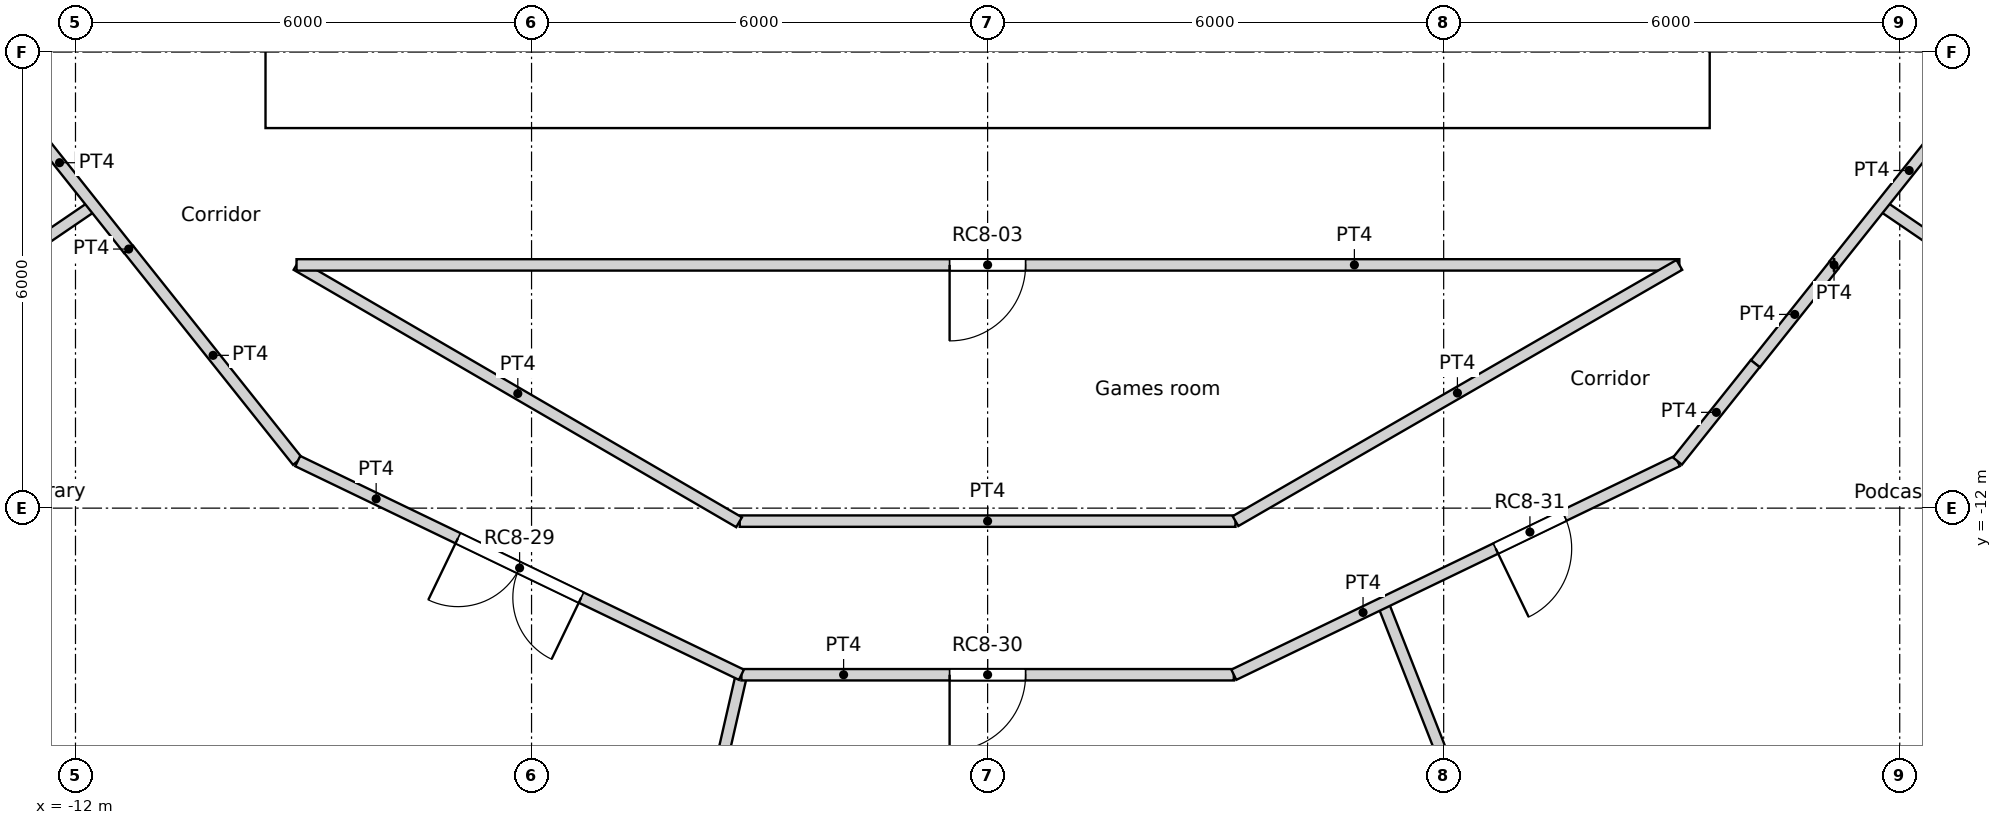
"""IFC4 building model, lengths in metres.
Left out: names, types, materials, properties, quantities, classifications, styles, units other than length and angle.
Written with IfcOpenShell. Run it as: python <this file> out.ifc"""

import sys

from ifc_helpers import new_model, si_unit, direction, frame, frame_2d, origin, origin_2d, place, context, subcontext, project, spatial, rectangle, circle, extrude, element, fill, save


model = new_model("IFC4")
c1 = context("Model", 3, precision=1e-05, world=origin(), true_north=direction((0.0, 1.0)))
c2 = subcontext(c1, "Body", "Model", "MODEL_VIEW")
j1 = project(units=[si_unit("LENGTHUNIT", "METRE"), si_unit("PLANEANGLEUNIT", "RADIAN")], contexts=[c1])
p1 = place(None, origin())
s1 = spatial("IfcSite", under=j1, at=p1, CompositionType="ELEMENT")
p2 = place(p1, origin())
s2 = spatial("IfcBuilding", under=s1, at=p2, CompositionType="ELEMENT")
p3 = place(p2, frame((0.0, 0.0, 305.4)))
s3 = spatial("IfcBuildingStorey", under=s2, at=p3, CompositionType="ELEMENT", Elevation=305.4)
p4 = place(p3, frame((11.735, -14.716, 0.0), z_axis=(0.0, 0.0, 1.0), x_axis=(1.0, 0.0, 0.0)))
e1 = element("IfcColumn", 1, at=p4, inside=s3, PredefinedType="COLUMN", context=c2, shape_type="SweptSolid", body=[
    extrude(circle(Radius=0.45, at=origin_2d()), origin(), (0.0, 0.0, 1.0), 3.6),
])
p5 = place(p3, frame((-9.5, -6.7, 0.0), z_axis=(0.0, 0.0, 1.0), x_axis=(1.0, 0.0, 0.0)))
e2 = element("IfcWall", 2, at=p5, inside=s3, PredefinedType="SOLIDWALL", context=c2, shape_type="SweptSolid", body=[
    extrude(rectangle(XDim=19.0, YDim=0.6, at=frame_2d((9.5, 0.0))), origin(), (0.0, 0.0, 1.0), 3.6),
])
p6 = place(p5, frame((10.4, 0.0, 0.0)))
e3 = element("IfcOpeningElement", 3, at=p6, cuts=e2, PredefinedType="OPENING", context=c2, shape_type="SweptSolid", body=[
    extrude(rectangle(XDim=1.0, YDim=2.1, at=frame_2d((0.5, 1.05))), frame((0.0, 0.3, 0.0), z_axis=(0.0, -1.0, 0.0), x_axis=(1.0, 0.0, 0.0)), (0.0, 0.0, 1.0), 0.6),
])
p7 = place(p5, frame((5.35, 0.0, 0.0)))
e4 = element("IfcOpeningElement", 4, at=p7, cuts=e2, PredefinedType="OPENING", context=c2, shape_type="SweptSolid", body=[
    extrude(rectangle(XDim=1.7, YDim=2.1, at=frame_2d((0.85, 1.05))), frame((0.0, 0.3, 0.0), z_axis=(0.0, -1.0, 0.0), x_axis=(1.0, 0.0, 0.0)), (0.0, 0.0, 1.0), 0.6),
])
p8 = place(p5, frame((11.95, 0.0, 0.0)))
e5 = element("IfcOpeningElement", 5, at=p8, cuts=e2, PredefinedType="OPENING", context=c2, shape_type="SweptSolid", body=[
    extrude(rectangle(XDim=1.7, YDim=2.1, at=frame_2d((0.85, 1.05))), frame((0.0, 0.3, 0.0), z_axis=(0.0, -1.0, 0.0), x_axis=(1.0, 0.0, 0.0)), (0.0, 0.0, 1.0), 0.6),
])
p9 = place(p3, frame((-9.2, -6.4, 0.0), z_axis=(0.0, 0.0, 1.0), x_axis=(0.0, 1.0, 0.0)))
e6 = element("IfcWall", 6, at=p9, inside=s3, PredefinedType="SOLIDWALL", context=c2, shape_type="SweptSolid", body=[
    extrude(rectangle(XDim=12.8, YDim=0.6, at=frame_2d((6.4, 0.0))), origin(), (0.0, 0.0, 1.0), 3.6),
])
p10 = place(p3, frame((9.2, -6.4, 0.0), z_axis=(0.0, 0.0, 1.0), x_axis=(0.0, 1.0, 0.0)))
e7 = element("IfcWall", 7, at=p10, inside=s3, PredefinedType="SOLIDWALL", context=c2, shape_type="SweptSolid", body=[
    extrude(rectangle(XDim=12.8, YDim=0.6, at=frame_2d((6.4, 0.0))), origin(), (0.0, 0.0, 1.0), 3.6),
])
p11 = place(p10, frame((6.4, 0.0, 0.0)))
e8 = element("IfcOpeningElement", 8, at=p11, cuts=e7, PredefinedType="OPENING", context=c2, shape_type="SweptSolid", body=[
    extrude(rectangle(XDim=1.8, YDim=2.1, at=frame_2d((0.9, 1.05))), frame((0.0, 0.3, 0.0), z_axis=(0.0, -1.0, 0.0), x_axis=(1.0, 0.0, 0.0)), (0.0, 0.0, 1.0), 0.6),
])
for number, where, z_axis, x_axis in (
    (9, (-2.25, -6.4, 0.0), (0.0, 0.0, 1.0), (0.0, 1.0, 0.0)),
    (10, (0.55, -6.4, 0.0), (0.0, 0.0, 1.0), (0.0, 1.0, 0.0)),
    (11, (2.25, -6.4, 0.0), (0.0, 0.0, 1.0), (0.0, 1.0, 0.0)),
):
    element("IfcWall", number, at=place(p3, frame(where, z_axis=z_axis, x_axis=x_axis)), inside=s3, PredefinedType="SOLIDWALL", context=c2, shape_type="SweptSolid", body=[
        extrude(rectangle(XDim=3.15, YDim=0.3, at=frame_2d((1.575, 0.0))), origin(), (0.0, 0.0, 1.0), 3.25),
    ])
p12 = place(p3, frame((-9.092, -8.8, 0.0), z_axis=(0.0, 0.0, 1.0), x_axis=(1.0, 0.0, 0.0)))
e12 = element("IfcWall", 12, at=p12, inside=s3, PredefinedType="PARTITIONING", context=c2, shape_type="SweptSolid", body=[
    extrude(rectangle(XDim=18.193, YDim=0.15, at=frame_2d((9.096, 0.0))), origin(), (0.0, 0.0, 1.0), 3.25),
])
p13 = place(p12, frame((8.592, 0.0, 0.0)))
e13 = element("IfcOpeningElement", 13, at=p13, cuts=e12, PredefinedType="OPENING", context=c2, shape_type="SweptSolid", body=[
    extrude(rectangle(XDim=1.0, YDim=2.04, at=frame_2d((0.5, 1.02))), frame((0.0, 0.075, 0.0), z_axis=(0.0, -1.0, 0.0), x_axis=(1.0, 0.0, 0.0)), (0.0, 0.0, 1.0), 0.15),
])
p14 = place(p3, frame((-9.092, -8.8, 0.0), z_axis=(0.0, 0.0, 1.0), x_axis=(0.864470922103, -0.502682827277, 0.0)))
e14 = element("IfcWall", 14, at=p14, inside=s3, PredefinedType="PARTITIONING", context=c2, shape_type="SweptSolid", body=[
    extrude(rectangle(XDim=6.735, YDim=0.15, at=frame_2d((3.368, 0.0))), origin(), (0.0, 0.0, 1.0), 3.25),
])
p15 = place(p3, frame((-11.3, -8.596, 0.0), z_axis=(0.0, 0.0, 1.0), x_axis=(0.623165080354, -0.782090328944, 0.0)))
e15 = element("IfcWall", 15, at=p15, inside=s3, PredefinedType="PARTITIONING", context=c2, shape_type="SweptSolid", body=[
    extrude(rectangle(XDim=3.564, YDim=0.15, at=frame_2d((1.782, 0.0))), origin(), (0.0, 0.0, 1.0), 3.25),
])
p16 = place(p3, frame((-11.3, -8.596, 0.0), z_axis=(0.0, 0.0, 1.0), x_axis=(0.0, 1.0, 0.0)))
e16 = element("IfcWall", 16, at=p16, inside=s3, PredefinedType="PARTITIONING", context=c2, shape_type="SweptSolid", body=[
    extrude(rectangle(XDim=0.009, YDim=0.15, at=frame_2d((0.005, 0.0))), origin(), (0.0, 0.0, 1.0), 3.25),
])
p17 = place(p3, frame((11.137, -8.8, 0.0), z_axis=(0.0, 0.0, 1.0), x_axis=(-1.0, 0.0, 0.0)))
e17 = element("IfcWall", 17, at=p17, inside=s3, PredefinedType="PARTITIONING", context=c2, shape_type="SweptSolid", body=[
    extrude(rectangle(XDim=0.003, YDim=0.15, at=frame_2d((0.001, 0.0))), origin(), (0.0, 0.0, 1.0), 3.25),
])
p18 = place(p3, frame((10.101, -10.101, 0.0), z_axis=(0.0, 0.0, 1.0), x_axis=(0.623098344652, 0.782143498913, 0.0)))
e18 = element("IfcWall", 18, at=p18, inside=s3, PredefinedType="PARTITIONING", context=c2, shape_type="SweptSolid", body=[
    extrude(rectangle(XDim=1.661, YDim=0.15, at=frame_2d((0.831, 0.0))), origin(), (0.0, 0.0, 1.0), 3.25),
])
p19 = place(p3, frame((11.134, -8.8, 0.0), z_axis=(0.0, 0.0, 1.0), x_axis=(0.623560523309, 0.781775078761, 0.0)))
e19 = element("IfcWall", 19, at=p19, inside=s3, PredefinedType="PARTITIONING", context=c2, shape_type="SweptSolid", body=[
    extrude(rectangle(XDim=3.177, YDim=0.15, at=frame_2d((1.589, 0.0))), origin(), (0.0, 0.0, 1.0), 3.25),
])
p20 = place(p3, frame((-13.115, -6.316, 0.0), z_axis=(0.0, 0.0, 1.0), x_axis=(0.622042479172, -0.782983495423, 0.0)))
e20 = element("IfcWall", 20, at=p20, inside=s3, PredefinedType="PARTITIONING", context=c2, shape_type="SweptSolid", body=[
    extrude(rectangle(XDim=2.911, YDim=0.15, at=frame_2d((1.456, 0.0))), origin(), (0.0, 0.0, 1.0), 3.25),
])
p21 = place(p3, frame((-3.261, -12.171, 0.0), z_axis=(0.0, 0.0, 1.0), x_axis=(1.0, 0.0, 0.0)))
e21 = element("IfcWall", 21, at=p21, inside=s3, PredefinedType="PARTITIONING", context=c2, shape_type="SweptSolid", body=[
    extrude(rectangle(XDim=6.522, YDim=0.15, at=frame_2d((3.261, 0.0))), origin(), (0.0, 0.0, 1.0), 3.25),
])
p22 = place(p3, frame((3.261, -12.171, 0.0), z_axis=(0.0, 0.0, 1.0), x_axis=(0.866066809554, 0.499928276245, 0.0)))
e22 = element("IfcWall", 22, at=p22, inside=s3, PredefinedType="PARTITIONING", context=c2, shape_type="SweptSolid", body=[
    extrude(rectangle(XDim=6.743, YDim=0.15, at=frame_2d((3.371, 0.0))), origin(), (0.0, 0.0, 1.0), 3.25),
])
p23 = place(p3, frame((-9.076, -11.381, 0.0), z_axis=(0.0, 0.0, 1.0), x_axis=(0.900976027191, -0.433868872388, 0.0)))
e23 = element("IfcWall", 23, at=p23, inside=s3, PredefinedType="PARTITIONING", context=c2, shape_type="SweptSolid", body=[
    extrude(rectangle(XDim=6.479, YDim=0.15, at=frame_2d((3.239, 0.0))), origin(), (0.0, 0.0, 1.0), 3.25),
])
p24 = place(p23, frame((2.34, 0.0, 0.0)))
e24 = element("IfcOpeningElement", 24, at=p24, cuts=e23, PredefinedType="OPENING", context=c2, shape_type="SweptSolid", body=[
    extrude(rectangle(XDim=1.8, YDim=2.1, at=frame_2d((0.9, 1.05))), frame((0.0, 0.075, 0.0), z_axis=(0.0, -1.0, 0.0), x_axis=(1.0, 0.0, 0.0)), (0.0, 0.0, 1.0), 0.15),
])
p25 = place(p3, frame((3.239, -14.192, 0.0), z_axis=(0.0, 0.0, 1.0), x_axis=(0.900851590682, 0.434127183629, 0.0)))
e25 = element("IfcWall", 25, at=p25, inside=s3, PredefinedType="PARTITIONING", context=c2, shape_type="SweptSolid", body=[
    extrude(rectangle(XDim=6.479, YDim=0.15, at=frame_2d((3.239, 0.0))), origin(), (0.0, 0.0, 1.0), 3.25),
])
p26 = place(p25, frame((3.825, 0.0, 0.0)))
e26 = element("IfcOpeningElement", 26, at=p26, cuts=e25, PredefinedType="OPENING", context=c2, shape_type="SweptSolid", body=[
    extrude(rectangle(XDim=1.0, YDim=2.04, at=frame_2d((0.5, 1.02))), frame((0.0, 0.075, 0.0), z_axis=(0.0, -1.0, 0.0), x_axis=(1.0, 0.0, 0.0)), (0.0, 0.0, 1.0), 0.15),
])
p27 = place(p3, frame((-3.239, -14.192, 0.0), z_axis=(0.0, 0.0, 1.0), x_axis=(1.0, 0.0, 0.0)))
e27 = element("IfcWall", 27, at=p27, inside=s3, PredefinedType="PARTITIONING", context=c2, shape_type="SweptSolid", body=[
    extrude(rectangle(XDim=6.478, YDim=0.15, at=frame_2d((3.239, 0.0))), origin(), (0.0, 0.0, 1.0), 3.25),
])
p28 = place(p27, frame((2.739, 0.0, 0.0)))
e28 = element("IfcOpeningElement", 28, at=p28, cuts=e27, PredefinedType="OPENING", context=c2, shape_type="SweptSolid", body=[
    extrude(rectangle(XDim=1.0, YDim=2.04, at=frame_2d((0.5, 1.02))), frame((0.0, 0.075, 0.0), z_axis=(0.0, -1.0, 0.0), x_axis=(1.0, 0.0, 0.0)), (0.0, 0.0, 1.0), 0.15),
])
p29 = place(p3, frame((9.076, -11.381, 0.0), z_axis=(0.0, 0.0, 1.0), x_axis=(0.623805208652, 0.781579849829, 0.0)))
e29 = element("IfcWall", 29, at=p29, inside=s3, PredefinedType="PARTITIONING", context=c2, shape_type="SweptSolid", body=[
    extrude(rectangle(XDim=1.64, YDim=0.15, at=frame_2d((0.82, 0.0))), origin(), (0.0, 0.0, 1.0), 3.25),
])
p30 = place(p3, frame((-16.336, -11.138, 0.0), z_axis=(0.0, 0.0, 1.0), x_axis=(0.82615274451, 0.563446219917, 0.0)))
e30 = element("IfcWall", 30, at=p30, inside=s3, PredefinedType="PARTITIONING", context=c2, shape_type="SweptSolid", body=[
    extrude(rectangle(XDim=5.54, YDim=0.15, at=frame_2d((2.77, 0.0))), origin(), (0.0, 0.0, 1.0), 3.25),
])
p31 = place(p3, frame((-4.4, -19.276, 0.0), z_axis=(0.0, 0.0, 1.0), x_axis=(0.222612505682, 0.974907007008, 0.0)))
e31 = element("IfcWall", 31, at=p31, inside=s3, PredefinedType="PARTITIONING", context=c2, shape_type="SweptSolid", body=[
    extrude(rectangle(XDim=5.215, YDim=0.15, at=frame_2d((2.607, 0.0))), origin(), (0.0, 0.0, 1.0), 3.25),
])
p32 = place(p3, frame((5.199, -13.248, 0.0), z_axis=(0.0, 0.0, 1.0), x_axis=(0.365334662456, -0.930876245485, 0.0)))
e32 = element("IfcWall", 32, at=p32, inside=s3, PredefinedType="PARTITIONING", context=c2, shape_type="SweptSolid", body=[
    extrude(rectangle(XDim=5.54, YDim=0.15, at=frame_2d((2.77, 0.0))), origin(), (0.0, 0.0, 1.0), 3.25),
])
p33 = place(p3, frame((11.759, -8.017, 0.0), z_axis=(0.0, 0.0, 1.0), x_axis=(0.826207761897, -0.563365542238, 0.0)))
e33 = element("IfcWall", 33, at=p33, inside=s3, PredefinedType="PARTITIONING", context=c2, shape_type="SweptSolid", body=[
    extrude(rectangle(XDim=5.54, YDim=0.15, at=frame_2d((2.77, 0.0))), origin(), (0.0, 0.0, 1.0), 3.25),
])
p34 = place(p6, origin())
e34 = element("IfcDoor", 34, at=p34, inside=s3, OperationType="SINGLE_SWING_LEFT", PredefinedType="DOOR", context=c2, shape_type="SweptSolid", body=[
    extrude(rectangle(XDim=1.0, YDim=2.1, at=frame_2d((0.5, 1.05))), frame((0.0, 0.025, 0.0), z_axis=(0.0, -1.0, 0.0), x_axis=(1.0, 0.0, 0.0)), (0.0, 0.0, 1.0), 0.05),
])
fill(e3, e34)
p35 = place(p7, origin())
e35 = element("IfcDoor", 35, at=p35, inside=s3, OperationType="DOUBLE_DOOR_SINGLE_SWING", PredefinedType="DOOR", context=c2, shape_type="SweptSolid", body=[
    extrude(rectangle(XDim=1.7, YDim=2.1, at=frame_2d((0.85, 1.05))), frame((0.0, 0.025, 0.0), z_axis=(0.0, -1.0, 0.0), x_axis=(1.0, 0.0, 0.0)), (0.0, 0.0, 1.0), 0.05),
])
fill(e4, e35)
p36 = place(p8, origin())
e36 = element("IfcDoor", 36, at=p36, inside=s3, OperationType="DOUBLE_DOOR_SINGLE_SWING", PredefinedType="DOOR", context=c2, shape_type="SweptSolid", body=[
    extrude(rectangle(XDim=1.7, YDim=2.1, at=frame_2d((0.85, 1.05))), frame((0.0, 0.025, 0.0), z_axis=(0.0, -1.0, 0.0), x_axis=(1.0, 0.0, 0.0)), (0.0, 0.0, 1.0), 0.05),
])
fill(e5, e36)
p37 = place(p13, origin())
e37 = element("IfcDoor", 37, at=p37, inside=s3, OperationType="SINGLE_SWING_RIGHT", PredefinedType="DOOR", context=c2, shape_type="SweptSolid", body=[
    extrude(rectangle(XDim=1.0, YDim=2.04, at=frame_2d((0.5, 1.02))), frame((0.0, 0.025, 0.0), z_axis=(0.0, -1.0, 0.0), x_axis=(1.0, 0.0, 0.0)), (0.0, 0.0, 1.0), 0.05),
])
fill(e13, e37)
p38 = place(p24, origin())
e38 = element("IfcDoor", 38, at=p38, inside=s3, OperationType="DOUBLE_DOOR_SINGLE_SWING", PredefinedType="DOOR", context=c2, shape_type="SweptSolid", body=[
    extrude(rectangle(XDim=1.8, YDim=2.1, at=frame_2d((0.9, 1.05))), frame((0.0, 0.025, 0.0), z_axis=(0.0, -1.0, 0.0), x_axis=(1.0, 0.0, 0.0)), (0.0, 0.0, 1.0), 0.05),
])
fill(e24, e38)
p39 = place(p28, origin())
e39 = element("IfcDoor", 39, at=p39, inside=s3, OperationType="SINGLE_SWING_RIGHT", PredefinedType="DOOR", context=c2, shape_type="SweptSolid", body=[
    extrude(rectangle(XDim=1.0, YDim=2.04, at=frame_2d((0.5, 1.02))), frame((0.0, 0.025, 0.0), z_axis=(0.0, -1.0, 0.0), x_axis=(1.0, 0.0, 0.0)), (0.0, 0.0, 1.0), 0.05),
])
fill(e28, e39)
p40 = place(p26, origin())
e40 = element("IfcDoor", 40, at=p40, inside=s3, OperationType="SINGLE_SWING_RIGHT", PredefinedType="DOOR", context=c2, shape_type="SweptSolid", body=[
    extrude(rectangle(XDim=1.0, YDim=2.04, at=frame_2d((0.5, 1.02))), frame((0.0, 0.025, 0.0), z_axis=(0.0, -1.0, 0.0), x_axis=(1.0, 0.0, 0.0)), (0.0, 0.0, 1.0), 0.05),
])
fill(e26, e40)
save(model, sys.argv[1])
